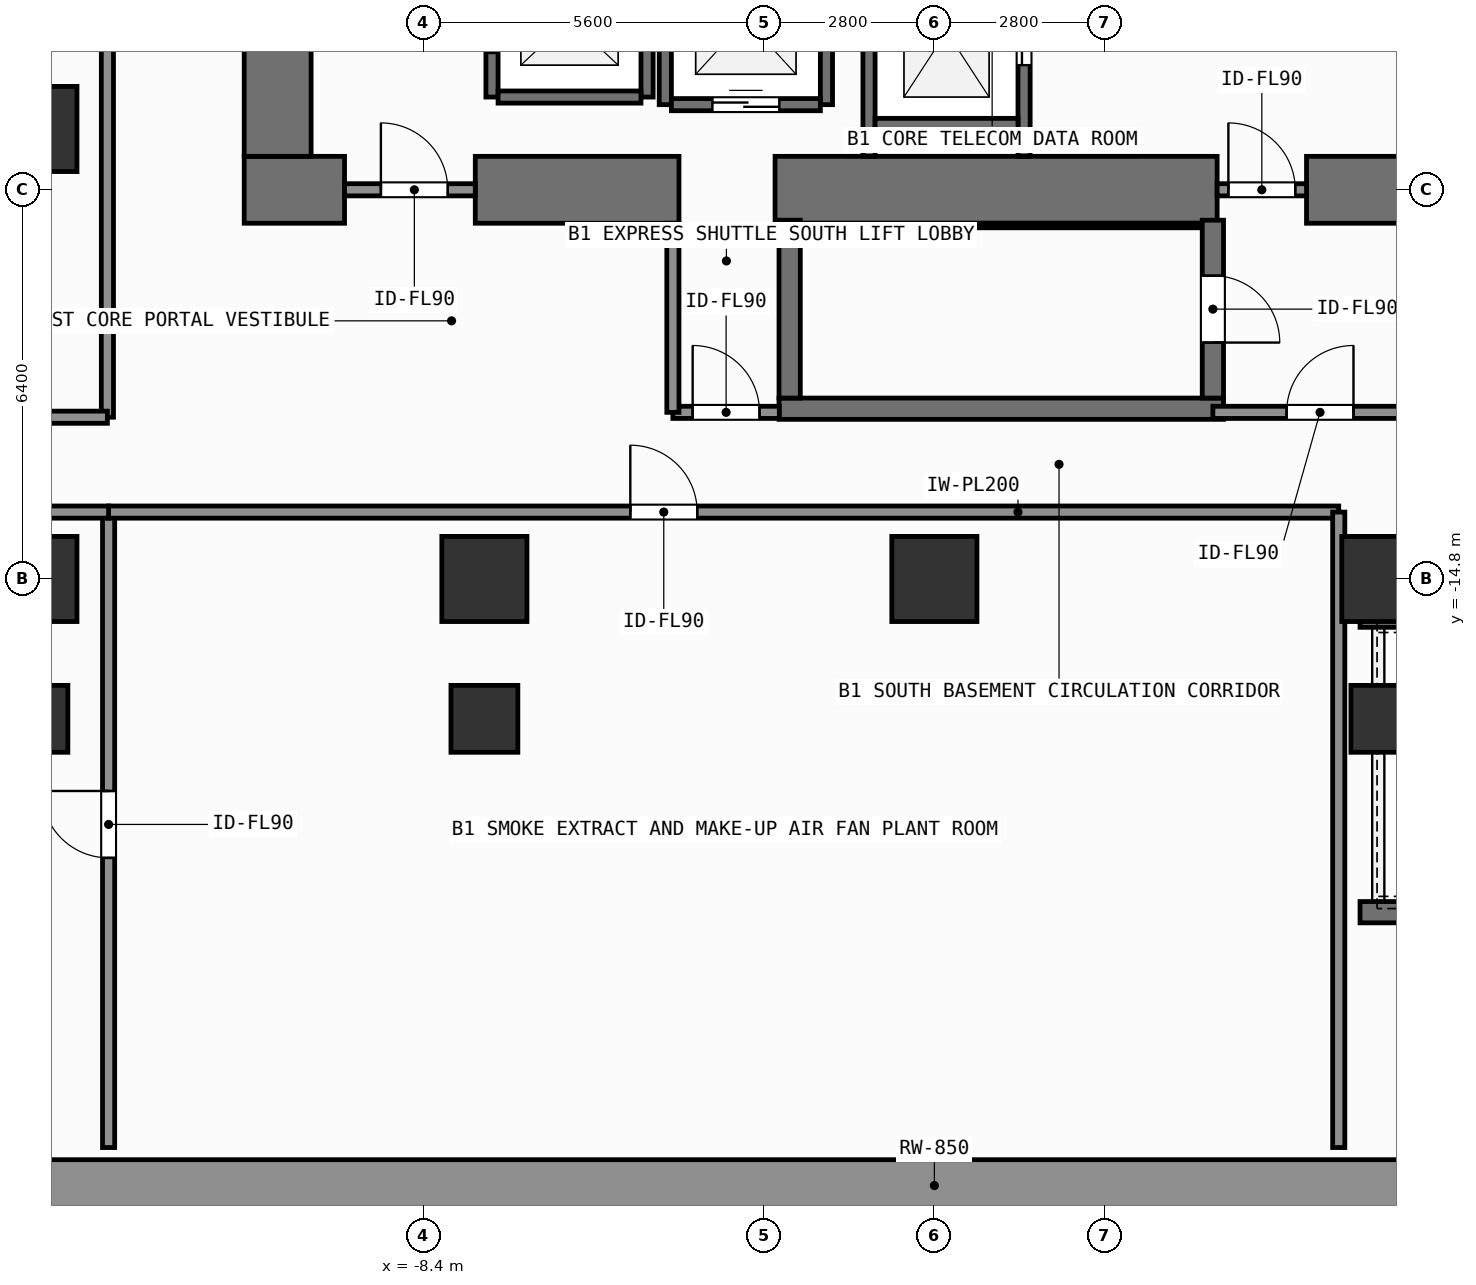
"""IFC4 building model, lengths in metres.
Left out: names, types, materials, properties, quantities, classifications, styles, units other than length and angle.
Written with IfcOpenShell. Run it as: python <this file> out.ifc"""

import sys

from ifc_helpers import new_model, si_unit, direction, frame, frame_2d, origin, origin_2d, place, context, subcontext, project, spatial, rectangle, extrude, element, fill, save


model = new_model("IFC4")
c1 = context("Model", 3, precision=1e-05, world=origin(), true_north=direction((0.0, 1.0)))
c2 = subcontext(c1, "Body", "Model", "MODEL_VIEW")
j1 = project(units=[si_unit("LENGTHUNIT", "METRE"), si_unit("PLANEANGLEUNIT", "RADIAN")], contexts=[c1])
p1 = place(None, origin())
s1 = spatial("IfcSite", under=j1, at=p1, CompositionType="ELEMENT")
p2 = place(p1, origin())
s2 = spatial("IfcBuilding", under=s1, at=p2, CompositionType="ELEMENT")
p3 = place(p2, frame((0.0, 0.0, -4.2)))
s3 = spatial("IfcBuildingStorey", under=s2, at=p3, CompositionType="ELEMENT", Elevation=-4.2)
p4 = place(p3, frame((-33.6, -24.775, 0.0), z_axis=(0.0, 0.0, 1.0), x_axis=(1.0, 0.0, 0.0)))
e1 = element("IfcWall", 1, at=p4, inside=s3, PredefinedType="SOLIDWALL", context=c2, shape_type="SweptSolid", body=[
    extrude(rectangle(XDim=67.2, YDim=0.85, at=frame_2d((33.6, 0.0))), origin(), (0.0, 0.0, 1.0), 4.2),
])
p5 = place(p3, frame((7.0, -20.28, 0.0), z_axis=(0.0, 0.0, 1.0), x_axis=(1.0, 0.0, 0.0)))
e2 = element("IfcWall", 2, at=p5, inside=s3, PredefinedType="SHEAR", context=c2, shape_type="SweptSolid", body=[
    extrude(rectangle(XDim=25.5, YDim=0.35, at=frame_2d((12.75, 0.0))), origin(), (0.0, 0.0, 1.0), 4.2),
])
p6 = place(p3, frame((7.0, -15.42, 0.0), z_axis=(0.0, 0.0, 1.0), x_axis=(1.0, 0.0, 0.0)))
e3 = element("IfcWall", 3, at=p6, inside=s3, PredefinedType="SHEAR", context=c2, shape_type="SweptSolid", body=[
    extrude(rectangle(XDim=25.75, YDim=0.35, at=frame_2d((12.875, 0.0))), origin(), (0.0, 0.0, 1.0), 4.2),
])
p7 = place(p3, frame((-11.35, -8.4, 0.0), z_axis=(0.0, 0.0, 1.0), x_axis=(1.0, 0.0, 0.0)))
e4 = element("IfcWall", 4, at=p7, inside=s3, PredefinedType="SHEAR", context=c2, shape_type="SweptSolid", body=[
    extrude(rectangle(XDim=1.65, YDim=1.1, at=frame_2d((0.825, 0.0))), origin(), (0.0, 0.0, 1.0), 4.2),
])
p8 = place(p3, frame((-7.55, -8.4, 0.0), z_axis=(0.0, 0.0, 1.0), x_axis=(1.0, 0.0, 0.0)))
e5 = element("IfcWall", 5, at=p8, inside=s3, PredefinedType="SHEAR", context=c2, shape_type="SweptSolid", body=[
    extrude(rectangle(XDim=3.35, YDim=1.1, at=frame_2d((1.675, 0.0))), origin(), (0.0, 0.0, 1.0), 4.2),
])
p9 = place(p3, frame((-2.62, -8.4, 0.0), z_axis=(0.0, 0.0, 1.0), x_axis=(1.0, 0.0, 0.0)))
e6 = element("IfcWall", 6, at=p9, inside=s3, PredefinedType="SHEAR", context=c2, shape_type="SweptSolid", body=[
    extrude(rectangle(XDim=7.27, YDim=1.1, at=frame_2d((3.635, 0.0))), origin(), (0.0, 0.0, 1.0), 4.2),
])
p10 = place(p3, frame((6.12, -8.4, 0.0), z_axis=(0.0, 0.0, 1.0), x_axis=(1.0, 0.0, 0.0)))
e7 = element("IfcWall", 7, at=p10, inside=s3, PredefinedType="SHEAR", context=c2, shape_type="SweptSolid", body=[
    extrude(rectangle(XDim=2.83, YDim=1.1, at=frame_2d((1.415, 0.0))), origin(), (0.0, 0.0, 1.0), 4.2),
])
p11 = place(p3, frame((-10.8, -7.85, 0.0), z_axis=(0.0, 0.0, 1.0), x_axis=(0.0, 1.0, 0.0)))
e8 = element("IfcWall", 8, at=p11, inside=s3, PredefinedType="SHEAR", context=c2, shape_type="SweptSolid", body=[
    extrude(rectangle(XDim=15.7, YDim=1.1, at=frame_2d((7.85, 0.0))), origin(), (0.0, 0.0, 1.0), 4.2),
])
p12 = place(p3, frame((-2.555, -12.0, 0.0), z_axis=(0.0, 0.0, 1.0), x_axis=(1.0, 0.0, 0.0)))
e9 = element("IfcWall", 9, at=p12, inside=s3, PredefinedType="SHEAR", context=c2, shape_type="SweptSolid", body=[
    extrude(rectangle(XDim=7.31, YDim=0.35, at=frame_2d((3.655, 0.0))), origin(), (0.0, 0.0, 1.0), 4.2),
])
p13 = place(p3, frame((-2.2, -8.988, 0.0), z_axis=(0.0, 0.0, 1.0), x_axis=(1.0, 0.0, 0.0)))
e10 = element("IfcWall", 10, at=p13, inside=s3, PredefinedType="SHEAR", context=c2, shape_type="SweptSolid", body=[
    extrude(rectangle(XDim=6.6, YDim=0.075, at=frame_2d((3.3, 0.0))), origin(), (0.0, 0.0, 1.0), 4.2),
])
p14 = place(p3, frame((-2.38, -11.825, 0.0), z_axis=(0.0, 0.0, 1.0), x_axis=(0.0, 1.0, 0.0)))
e11 = element("IfcWall", 11, at=p14, inside=s3, PredefinedType="SHEAR", context=c2, shape_type="SweptSolid", body=[
    extrude(rectangle(XDim=2.925, YDim=0.35, at=frame_2d((1.462, 0.0))), origin(), (0.0, 0.0, 1.0), 4.2),
])
p15 = place(p3, frame((4.58, -8.9, 0.0), z_axis=(0.0, 0.0, 1.0), x_axis=(0.0, -1.0, 0.0)))
e12 = element("IfcWall", 12, at=p15, inside=s3, PredefinedType="SHEAR", context=c2, shape_type="SweptSolid", body=[
    extrude(rectangle(XDim=2.925, YDim=0.35, at=frame_2d((1.462, 0.0))), origin(), (0.0, 0.0, 1.0), 4.2),
])
p16 = place(p15, frame((0.913, 0.0, 0.0)))
e13 = element("IfcOpeningElement", 13, at=p16, cuts=e12, PredefinedType="OPENING", context=c2, shape_type="SweptSolid", body=[
    extrude(rectangle(XDim=1.1, YDim=2.15, at=frame_2d((0.55, 1.075))), frame((0.0, 0.185, 0.0), z_axis=(0.0, -1.0, 0.0), x_axis=(1.0, 0.0, 0.0)), (0.0, 0.0, 1.0), 0.37),
])
for number, where, z_axis, x_axis in (
    (14, (-14.8, -14.8, 0.0), (0.0, 0.0, 1.0), (1.0, 0.0, 0.0)),
    (15, (-7.4, -14.8, 0.0), (0.0, 0.0, 1.0), (1.0, 0.0, 0.0)),
    (16, (0.0, -14.8, 0.0), (0.0, 0.0, 1.0), (1.0, 0.0, 0.0)),
    (17, (7.4, -14.8, 0.0), (0.0, 0.0, 1.0), (1.0, 0.0, 0.0)),
    (18, (-14.8, -7.4, 0.0), (0.0, 0.0, 1.0), (1.0, 0.0, 0.0)),
):
    element("IfcColumn", number, at=place(p3, frame(where, z_axis=z_axis, x_axis=x_axis)), inside=s3, PredefinedType="COLUMN", context=c2, shape_type="SweptSolid", body=[
        extrude(rectangle(XDim=1.4, YDim=1.4, at=origin_2d()), origin(), (0.0, 0.0, 1.0), 4.2),
    ])
for number, where, z_axis, x_axis in (
    (19, (-14.8, -17.1, 0.0), (0.0, 0.0, 1.0), (1.0, 0.0, 0.0)),
    (20, (-7.4, -17.1, 0.0), (0.0, 0.0, 1.0), (1.0, 0.0, 0.0)),
    (21, (7.4, -17.1, 0.0), (0.0, 0.0, 1.0), (1.0, 0.0, 0.0)),
):
    element("IfcColumn", number, at=place(p3, frame(where, z_axis=z_axis, x_axis=x_axis)), inside=s3, PredefinedType="COLUMN", context=c2, shape_type="SweptSolid", body=[
        extrude(rectangle(XDim=1.1, YDim=1.1, at=origin_2d()), origin(), (0.0, 0.0, 1.0), 4.2),
    ])
p17 = place(p3, frame((-7.275, -6.875, 0.0), z_axis=(0.0, 0.0, 1.0), x_axis=(0.0, 1.0, 0.0)))
e22 = element("IfcWall", 22, at=p17, inside=s3, PredefinedType="SHEAR", context=c2, shape_type="SweptSolid", body=[
    extrude(rectangle(XDim=2.55, YDim=0.2, at=frame_2d((1.275, 0.0))), origin(), (0.0, 0.0, 1.0), 3.9),
])
p18 = place(p17, frame((0.725, 0.0, 0.0)))
e23 = element("IfcOpeningElement", 23, at=p18, cuts=e22, PredefinedType="OPENING", context=c2, shape_type="SweptSolid", body=[
    extrude(rectangle(XDim=1.1, YDim=2.2, at=frame_2d((0.55, 1.1))), frame((0.0, 0.11, 0.0), z_axis=(0.0, -1.0, 0.0), x_axis=(1.0, 0.0, 0.0)), (0.0, 0.0, 1.0), 0.22),
])
p19 = place(p3, frame((-4.725, -6.875, 0.0), z_axis=(0.0, 0.0, 1.0), x_axis=(0.0, 1.0, 0.0)))
e24 = element("IfcWall", 24, at=p19, inside=s3, PredefinedType="SHEAR", context=c2, shape_type="SweptSolid", body=[
    extrude(rectangle(XDim=2.55, YDim=0.2, at=frame_2d((1.275, 0.0))), origin(), (0.0, 0.0, 1.0), 3.9),
])
p20 = place(p3, frame((-7.175, -6.875, 0.0), z_axis=(0.0, 0.0, 1.0), x_axis=(1.0, 0.0, 0.0)))
e25 = element("IfcWall", 25, at=p20, inside=s3, PredefinedType="SHEAR", context=c2, shape_type="SweptSolid", body=[
    extrude(rectangle(XDim=2.35, YDim=0.2, at=frame_2d((1.175, 0.0))), origin(), (0.0, 0.0, 1.0), 3.9),
])
for number, where, z_axis, x_axis in (
    (26, (-4.425, -7.0, 0.0), (0.0, 0.0, 1.0), (0.0, 1.0, 0.0)),
    (27, (-1.775, -7.0, 0.0), (0.0, 0.0, 1.0), (0.0, 1.0, 0.0)),
):
    element("IfcWall", number, at=place(p3, frame(where, z_axis=z_axis, x_axis=x_axis)), inside=s3, PredefinedType="SHEAR", context=c2, shape_type="SweptSolid", body=[
        extrude(rectangle(XDim=2.8, YDim=0.2, at=frame_2d((1.4, 0.0))), origin(), (0.0, 0.0, 1.0), 3.9),
    ])
p21 = place(p3, frame((-4.325, -7.0, 0.0), z_axis=(0.0, 0.0, 1.0), x_axis=(1.0, 0.0, 0.0)))
e28 = element("IfcWall", 28, at=p21, inside=s3, PredefinedType="SHEAR", context=c2, shape_type="SweptSolid", body=[
    extrude(rectangle(XDim=2.45, YDim=0.2, at=frame_2d((1.225, 0.0))), origin(), (0.0, 0.0, 1.0), 3.9),
])
p22 = place(p21, frame((0.675, 0.0, 0.0)))
e29 = element("IfcOpeningElement", 29, at=p22, cuts=e28, PredefinedType="OPENING", context=c2, shape_type="SweptSolid", body=[
    extrude(rectangle(XDim=1.1, YDim=2.2, at=frame_2d((0.55, 1.1))), frame((0.0, 0.11, 0.0), z_axis=(0.0, -1.0, 0.0), x_axis=(1.0, 0.0, 0.0)), (0.0, 0.0, 1.0), 0.22),
])
p23 = place(p3, frame((-1.075, -7.85, 0.0), z_axis=(0.0, 0.0, 1.0), x_axis=(0.0, 1.0, 0.0)))
e30 = element("IfcWall", 30, at=p23, inside=s3, PredefinedType="SHEAR", context=c2, shape_type="SweptSolid", body=[
    extrude(rectangle(XDim=3.575, YDim=0.2, at=frame_2d((1.788, 0.0))), origin(), (0.0, 0.0, 1.0), 3.9),
])
p24 = place(p3, frame((1.475, -7.85, 0.0), z_axis=(0.0, 0.0, 1.0), x_axis=(0.0, 1.0, 0.0)))
e31 = element("IfcWall", 31, at=p24, inside=s3, PredefinedType="SHEAR", context=c2, shape_type="SweptSolid", body=[
    extrude(rectangle(XDim=3.575, YDim=0.2, at=frame_2d((1.788, 0.0))), origin(), (0.0, 0.0, 1.0), 3.9),
])
p25 = place(p24, frame((1.5, 0.0, 0.0)))
e32 = element("IfcOpeningElement", 32, at=p25, cuts=e31, PredefinedType="OPENING", context=c2, shape_type="SweptSolid", body=[
    extrude(rectangle(XDim=1.1, YDim=2.2, at=frame_2d((0.55, 1.1))), frame((0.0, 0.11, 0.0), z_axis=(0.0, -1.0, 0.0), x_axis=(1.0, 0.0, 0.0)), (0.0, 0.0, 1.0), 0.22),
])
p26 = place(p3, frame((-0.975, -7.325, 0.0), z_axis=(0.0, 0.0, 1.0), x_axis=(1.0, 0.0, 0.0)))
e33 = element("IfcWall", 33, at=p26, inside=s3, PredefinedType="SHEAR", context=c2, shape_type="SweptSolid", body=[
    extrude(rectangle(XDim=2.35, YDim=0.2, at=frame_2d((1.175, 0.0))), origin(), (0.0, 0.0, 1.0), 3.9),
])
p27 = place(p3, frame((4.58, -12.06, 0.0), z_axis=(0.0, 0.0, 1.0), x_axis=(1.0, 0.0, 0.0)))
e34 = element("IfcWall", 34, at=p27, inside=s3, PredefinedType="SOLIDWALL", context=c2, shape_type="SweptSolid", body=[
    extrude(rectangle(XDim=3.7, YDim=0.2, at=frame_2d((1.85, 0.0))), origin(), (0.0, 0.0, 1.0), 3.9),
])
p28 = place(p27, frame((1.212, 0.0, 0.0)))
e35 = element("IfcOpeningElement", 35, at=p28, cuts=e34, PredefinedType="OPENING", context=c2, shape_type="SweptSolid", body=[
    extrude(rectangle(XDim=1.1, YDim=2.15, at=frame_2d((0.55, 1.075))), frame((0.0, 0.11, 0.0), z_axis=(0.0, -1.0, 0.0), x_axis=(1.0, 0.0, 0.0)), (0.0, 0.0, 1.0), 0.22),
])
p29 = place(p3, frame((4.65, -8.4, 0.0), z_axis=(0.0, 0.0, 1.0), x_axis=(1.0, 0.0, 0.0)))
e36 = element("IfcWall", 36, at=p29, inside=s3, PredefinedType="SOLIDWALL", context=c2, shape_type="SweptSolid", body=[
    extrude(rectangle(XDim=1.47, YDim=0.2, at=frame_2d((0.735, 0.0))), origin(), (0.0, 0.0, 1.0), 2.94),
])
p30 = place(p29, frame((0.185, 0.0, 0.0)))
e37 = element("IfcOpeningElement", 37, at=p30, cuts=e36, PredefinedType="OPENING", context=c2, shape_type="SweptSolid", body=[
    extrude(rectangle(XDim=1.1, YDim=2.15, at=frame_2d((0.55, 1.075))), frame((0.0, 0.11, 0.0), z_axis=(0.0, -1.0, 0.0), x_axis=(1.0, 0.0, 0.0)), (0.0, 0.0, 1.0), 0.22),
])
p31 = place(p3, frame((-9.7, -8.4, 0.0), z_axis=(0.0, 0.0, 1.0), x_axis=(1.0, 0.0, 0.0)))
e38 = element("IfcWall", 38, at=p31, inside=s3, PredefinedType="SOLIDWALL", context=c2, shape_type="SweptSolid", body=[
    extrude(rectangle(XDim=2.15, YDim=0.2, at=frame_2d((1.075, 0.0))), origin(), (0.0, 0.0, 1.0), 2.94),
])
p32 = place(p31, frame((0.598, 0.0, 0.0)))
e39 = element("IfcOpeningElement", 39, at=p32, cuts=e38, PredefinedType="OPENING", context=c2, shape_type="SweptSolid", body=[
    extrude(rectangle(XDim=1.1, YDim=2.15, at=frame_2d((0.55, 1.075))), frame((0.0, 0.11, 0.0), z_axis=(0.0, -1.0, 0.0), x_axis=(1.0, 0.0, 0.0)), (0.0, 0.0, 1.0), 0.22),
])
p33 = place(p3, frame((-4.3, -12.06, 0.0), z_axis=(0.0, 0.0, 1.0), x_axis=(1.0, 0.0, 0.0)))
e40 = element("IfcWall", 40, at=p33, inside=s3, PredefinedType="SOLIDWALL", context=c2, shape_type="SweptSolid", body=[
    extrude(rectangle(XDim=1.75, YDim=0.2, at=frame_2d((0.875, 0.0))), origin(), (0.0, 0.0, 1.0), 3.9),
])
p34 = place(p33, frame((0.325, 0.0, 0.0)))
e41 = element("IfcOpeningElement", 41, at=p34, cuts=e40, PredefinedType="OPENING", context=c2, shape_type="SweptSolid", body=[
    extrude(rectangle(XDim=1.1, YDim=2.15, at=frame_2d((0.55, 1.075))), frame((0.0, 0.11, 0.0), z_axis=(0.0, -1.0, 0.0), x_axis=(1.0, 0.0, 0.0)), (0.0, 0.0, 1.0), 0.22),
])
p35 = place(p3, frame((-13.6, -12.14, 0.0), z_axis=(0.0, 0.0, 1.0), x_axis=(0.0, 1.0, 0.0)))
e42 = element("IfcWall", 42, at=p35, inside=s3, PredefinedType="SOLIDWALL", context=c2, shape_type="SweptSolid", body=[
    extrude(rectangle(XDim=16.64, YDim=0.2, at=frame_2d((8.32, 0.0))), origin(), (0.0, 0.0, 1.0), 3.9),
])
p36 = place(p35, frame((6.964, 0.0, 0.0)))
e43 = element("IfcOpeningElement", 43, at=p36, cuts=e42, PredefinedType="OPENING", context=c2, shape_type="SweptSolid", body=[
    extrude(rectangle(XDim=1.1, YDim=2.15, at=frame_2d((0.55, 1.075))), frame((0.0, 0.11, 0.0), z_axis=(0.0, -1.0, 0.0), x_axis=(1.0, 0.0, 0.0)), (0.0, 0.0, 1.0), 0.22),
])
p37 = place(p3, frame((-13.58, -24.15, 0.0), z_axis=(0.0, 0.0, 1.0), x_axis=(0.0, 1.0, 0.0)))
e44 = element("IfcWall", 44, at=p37, inside=s3, PredefinedType="SOLIDWALL", context=c2, shape_type="SweptSolid", body=[
    extrude(rectangle(XDim=10.45, YDim=0.2, at=frame_2d((5.225, 0.0))), origin(), (0.0, 0.0, 1.0), 3.9),
])
p38 = place(p37, frame((4.763, 0.0, 0.0)))
e45 = element("IfcOpeningElement", 45, at=p38, cuts=e44, PredefinedType="OPENING", context=c2, shape_type="SweptSolid", body=[
    extrude(rectangle(XDim=1.1, YDim=2.15, at=frame_2d((0.55, 1.075))), frame((0.0, 0.11, 0.0), z_axis=(0.0, -1.0, 0.0), x_axis=(1.0, 0.0, 0.0)), (0.0, 0.0, 1.0), 0.22),
])
p39 = place(p3, frame((-13.58, -13.7, 0.0), z_axis=(0.0, 0.0, 1.0), x_axis=(1.0, 0.0, 0.0)))
e46 = element("IfcWall", 46, at=p39, inside=s3, PredefinedType="SOLIDWALL", context=c2, shape_type="SweptSolid", body=[
    extrude(rectangle(XDim=20.23, YDim=0.2, at=frame_2d((10.115, 0.0))), origin(), (0.0, 0.0, 1.0), 3.9),
])
p40 = place(p39, frame((8.58, 0.0, 0.0)))
e47 = element("IfcOpeningElement", 47, at=p40, cuts=e46, PredefinedType="OPENING", context=c2, shape_type="SweptSolid", body=[
    extrude(rectangle(XDim=1.1, YDim=2.15, at=frame_2d((0.55, 1.075))), frame((0.0, 0.11, 0.0), z_axis=(0.0, -1.0, 0.0), x_axis=(1.0, 0.0, 0.0)), (0.0, 0.0, 1.0), 0.22),
])
p41 = place(p3, frame((-4.3, -12.06, 0.0), z_axis=(0.0, 0.0, 1.0), x_axis=(0.0, 1.0, 0.0)))
e48 = element("IfcWall", 48, at=p41, inside=s3, PredefinedType="SOLIDWALL", context=c2, shape_type="SweptSolid", body=[
    extrude(rectangle(XDim=3.11, YDim=0.2, at=frame_2d((1.555, 0.0))), origin(), (0.0, 0.0, 1.0), 3.9),
])
p42 = place(p3, frame((-32.65, -12.14, 0.0), z_axis=(0.0, 0.0, 1.0), x_axis=(1.0, 0.0, 0.0)))
e49 = element("IfcWall", 49, at=p42, inside=s3, PredefinedType="SOLIDWALL", context=c2, shape_type="SweptSolid", body=[
    extrude(rectangle(XDim=19.05, YDim=0.2, at=frame_2d((9.525, 0.0))), origin(), (0.0, 0.0, 1.0), 3.9),
])
p43 = place(p3, frame((-32.65, -13.7, 0.0), z_axis=(0.0, 0.0, 1.0), x_axis=(1.0, 0.0, 0.0)))
e50 = element("IfcWall", 50, at=p43, inside=s3, PredefinedType="SOLIDWALL", context=c2, shape_type="SweptSolid", body=[
    extrude(rectangle(XDim=19.07, YDim=0.2, at=frame_2d((9.535, 0.0))), origin(), (0.0, 0.0, 1.0), 3.9),
])
p44 = place(p3, frame((6.65, -24.15, 0.0), z_axis=(0.0, 0.0, 1.0), x_axis=(0.0, 1.0, 0.0)))
e51 = element("IfcWall", 51, at=p44, inside=s3, PredefinedType="SOLIDWALL", context=c2, shape_type="SweptSolid", body=[
    extrude(rectangle(XDim=10.45, YDim=0.2, at=frame_2d((5.225, 0.0))), origin(), (0.0, 0.0, 1.0), 3.9),
])
p45 = place(p18, origin())
e52 = element("IfcDoor", 52, at=p45, inside=s3, OperationType="SLIDING_TO_LEFT", PredefinedType="DOOR", context=c2, shape_type="SweptSolid", body=[
    extrude(rectangle(XDim=1.1, YDim=2.2, at=frame_2d((0.55, 1.1))), frame((0.0, 0.025, 0.0), z_axis=(0.0, -1.0, 0.0), x_axis=(1.0, 0.0, 0.0)), (0.0, 0.0, 1.0), 0.05),
])
fill(e23, e52)
p46 = place(p22, origin())
e53 = element("IfcDoor", 53, at=p46, inside=s3, OperationType="SLIDING_TO_LEFT", PredefinedType="DOOR", context=c2, shape_type="SweptSolid", body=[
    extrude(rectangle(XDim=1.1, YDim=2.2, at=frame_2d((0.55, 1.1))), frame((0.0, 0.025, 0.0), z_axis=(0.0, -1.0, 0.0), x_axis=(1.0, 0.0, 0.0)), (0.0, 0.0, 1.0), 0.05),
])
fill(e29, e53)
p47 = place(p25, origin())
e54 = element("IfcDoor", 54, at=p47, inside=s3, OperationType="SLIDING_TO_LEFT", PredefinedType="DOOR", context=c2, shape_type="SweptSolid", body=[
    extrude(rectangle(XDim=1.1, YDim=2.2, at=frame_2d((0.55, 1.1))), frame((0.0, 0.025, 0.0), z_axis=(0.0, -1.0, 0.0), x_axis=(1.0, 0.0, 0.0)), (0.0, 0.0, 1.0), 0.05),
])
fill(e32, e54)
p48 = place(p16, origin())
e55 = element("IfcDoor", 55, at=p48, inside=s3, OperationType="SINGLE_SWING_RIGHT", PredefinedType="DOOR", context=c2, shape_type="SweptSolid", body=[
    extrude(rectangle(XDim=1.1, YDim=2.15, at=frame_2d((0.55, 1.075))), frame((0.0, 0.025, 0.0), z_axis=(0.0, -1.0, 0.0), x_axis=(1.0, 0.0, 0.0)), (0.0, 0.0, 1.0), 0.05),
])
fill(e13, e55)
p49 = place(p28, origin())
e56 = element("IfcDoor", 56, at=p49, inside=s3, OperationType="SINGLE_SWING_RIGHT", PredefinedType="DOOR", context=c2, shape_type="SweptSolid", body=[
    extrude(rectangle(XDim=1.1, YDim=2.15, at=frame_2d((0.55, 1.075))), frame((0.0, 0.025, 0.0), z_axis=(0.0, -1.0, 0.0), x_axis=(1.0, 0.0, 0.0)), (0.0, 0.0, 1.0), 0.05),
])
fill(e35, e56)
p50 = place(p30, origin())
e57 = element("IfcDoor", 57, at=p50, inside=s3, OperationType="SINGLE_SWING_LEFT", PredefinedType="DOOR", context=c2, shape_type="SweptSolid", body=[
    extrude(rectangle(XDim=1.1, YDim=2.15, at=frame_2d((0.55, 1.075))), frame((0.0, 0.025, 0.0), z_axis=(0.0, -1.0, 0.0), x_axis=(1.0, 0.0, 0.0)), (0.0, 0.0, 1.0), 0.05),
])
fill(e37, e57)
p51 = place(p32, origin())
e58 = element("IfcDoor", 58, at=p51, inside=s3, OperationType="SINGLE_SWING_LEFT", PredefinedType="DOOR", context=c2, shape_type="SweptSolid", body=[
    extrude(rectangle(XDim=1.1, YDim=2.15, at=frame_2d((0.55, 1.075))), frame((0.0, 0.025, 0.0), z_axis=(0.0, -1.0, 0.0), x_axis=(1.0, 0.0, 0.0)), (0.0, 0.0, 1.0), 0.05),
])
fill(e39, e58)
p52 = place(p34, origin())
e59 = element("IfcDoor", 59, at=p52, inside=s3, OperationType="SINGLE_SWING_LEFT", PredefinedType="DOOR", context=c2, shape_type="SweptSolid", body=[
    extrude(rectangle(XDim=1.1, YDim=2.15, at=frame_2d((0.55, 1.075))), frame((0.0, 0.025, 0.0), z_axis=(0.0, -1.0, 0.0), x_axis=(1.0, 0.0, 0.0)), (0.0, 0.0, 1.0), 0.05),
])
fill(e41, e59)
p53 = place(p38, origin())
e60 = element("IfcDoor", 60, at=p53, inside=s3, OperationType="SINGLE_SWING_RIGHT", PredefinedType="DOOR", context=c2, shape_type="SweptSolid", body=[
    extrude(rectangle(XDim=1.1, YDim=2.15, at=frame_2d((0.55, 1.075))), frame((0.0, 0.025, 0.0), z_axis=(0.0, -1.0, 0.0), x_axis=(1.0, 0.0, 0.0)), (0.0, 0.0, 1.0), 0.05),
])
fill(e45, e60)
p54 = place(p40, origin())
e61 = element("IfcDoor", 61, at=p54, inside=s3, OperationType="SINGLE_SWING_LEFT", PredefinedType="DOOR", context=c2, shape_type="SweptSolid", body=[
    extrude(rectangle(XDim=1.1, YDim=2.15, at=frame_2d((0.55, 1.075))), frame((0.0, 0.025, 0.0), z_axis=(0.0, -1.0, 0.0), x_axis=(1.0, 0.0, 0.0)), (0.0, 0.0, 1.0), 0.05),
])
fill(e47, e61)
save(model, sys.argv[1])
